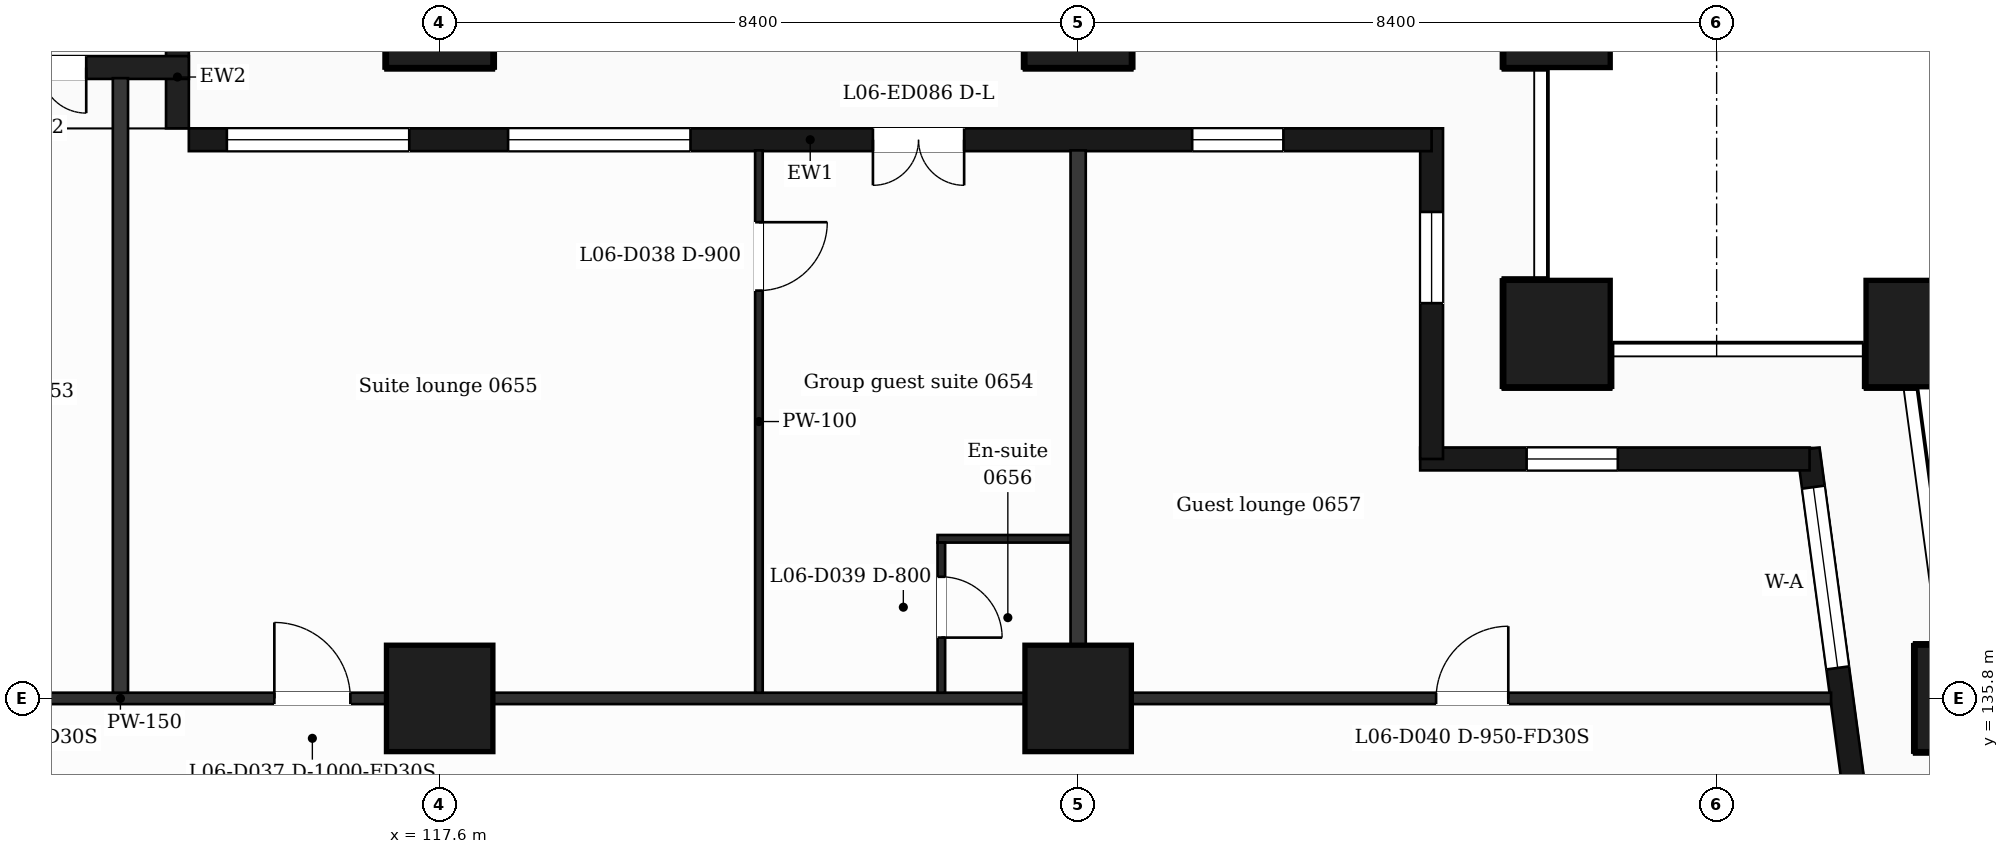
"""IFC4 building model, lengths in metres.
Left out: names, types, materials, properties, quantities, classifications, styles, units other than length and angle.
Written with IfcOpenShell. Run it as: python <this file> out.ifc"""

import sys

from ifc_helpers import new_model, si_unit, direction, frame, frame_2d, origin, origin_2d, place, context, subcontext, project, spatial, rectangle, extrude, element, fill, save


model = new_model("IFC4")
c1 = context("Model", 3, precision=1e-05, world=origin(), true_north=direction((0.0, 1.0)))
c2 = subcontext(c1, "Body", "Model", "MODEL_VIEW")
j1 = project(units=[si_unit("LENGTHUNIT", "METRE"), si_unit("PLANEANGLEUNIT", "RADIAN")], contexts=[c1])
p1 = place(None, origin())
s1 = spatial("IfcSite", under=j1, at=p1, CompositionType="ELEMENT")
p2 = place(p1, origin())
s2 = spatial("IfcBuilding", under=s1, at=p2, CompositionType="ELEMENT")
p3 = place(p2, frame((0.0, 0.0, 39.0)))
s3 = spatial("IfcBuildingStorey", under=s2, at=p3, CompositionType="ELEMENT", Elevation=39.0)
for number, where, z_axis, x_axis in (
    (1, (132.3, 140.6, -0.32), (0.0, 0.0, 1.0), (1.0, 0.0, 0.0)),
    (2, (137.065, 140.6, -0.32), (0.0, 0.0, 1.0), (1.0, 0.0, 0.0)),
    (3, (117.6, 135.8, -0.32), (0.0, 0.0, 1.0), (1.0, 0.0, 0.0)),
    (4, (126.0, 135.8, -0.32), (0.0, 0.0, 1.0), (1.0, 0.0, 0.0)),
    (5, (137.711, 135.8, -0.32), (0.0, 0.0, 1.0), (1.0, 0.0, 0.0)),
    (6, (117.6, 144.8, -0.32), (0.0, 0.0, 1.0), (1.0, 0.0, 0.0)),
    (7, (126.0, 144.8, -0.32), (0.0, 0.0, 1.0), (1.0, 0.0, 0.0)),
    (8, (132.3, 144.8, -0.32), (0.0, 0.0, 1.0), (1.0, 0.0, 0.0)),
):
    element("IfcColumn", number, at=place(p3, frame(where, z_axis=z_axis, x_axis=x_axis)), inside=s3, PredefinedType="COLUMN", context=c2, shape_type="SweptSolid", body=[
        extrude(rectangle(XDim=1.4, YDim=1.4, at=origin_2d()), origin(), (0.0, 0.0, 1.0), 3.82),
    ])
p4 = place(p3, frame((136.504, 132.4, 0.0), z_axis=(0.0, 0.0, 1.0), x_axis=(-0.133399697462, 0.99106231929, 0.0)))
e9 = element("IfcWall", 9, at=p4, inside=s3, PredefinedType="SOLIDWALL", context=c2, shape_type="SweptSolid", body=[
    extrude(rectangle(XDim=6.74, YDim=0.3, at=frame_2d((3.37, 0.0))), origin(), (0.0, 0.0, 1.0), 3.18),
])
p5 = place(p4, frame((1.115, 0.0, 0.0)))
e10 = element("IfcOpeningElement", 10, at=p5, cuts=e9, PredefinedType="OPENING", context=c2, shape_type="SweptSolid", body=[
    extrude(rectangle(XDim=1.2, YDim=2.4, at=frame_2d((0.6, 1.2))), frame((0.0, 0.16, 0.0), z_axis=(0.0, -1.0, 0.0), x_axis=(1.0, 0.0, 0.0)), (0.0, 0.0, 1.0), 0.32),
])
p6 = place(p4, frame((3.835, 0.0, 0.9)))
e11 = element("IfcOpeningElement", 11, at=p6, cuts=e9, PredefinedType="OPENING", context=c2, shape_type="SweptSolid", body=[
    extrude(rectangle(XDim=2.4, YDim=2.1, at=frame_2d((1.2, 1.05))), frame((0.0, 0.16, 0.0), z_axis=(0.0, -1.0, 0.0), x_axis=(1.0, 0.0, 0.0)), (0.0, 0.0, 1.0), 0.32),
])
p7 = place(p3, frame((135.623, 138.95, 0.0), z_axis=(0.0, 0.0, 1.0), x_axis=(-1.0, 0.0, 0.0)))
e12 = element("IfcWall", 12, at=p7, inside=s3, PredefinedType="SOLIDWALL", context=c2, shape_type="SweptSolid", body=[
    extrude(rectangle(XDim=5.123, YDim=0.3, at=frame_2d((2.561, 0.0))), origin(), (0.0, 0.0, 1.0), 3.18),
])
p8 = place(p7, frame((2.523, 0.0, 0.9)))
e13 = element("IfcOpeningElement", 13, at=p8, cuts=e12, PredefinedType="OPENING", context=c2, shape_type="SweptSolid", body=[
    extrude(rectangle(XDim=1.2, YDim=2.1, at=frame_2d((0.6, 1.05))), frame((0.0, 0.16, 0.0), z_axis=(0.0, -1.0, 0.0), x_axis=(1.0, 0.0, 0.0)), (0.0, 0.0, 1.0), 0.32),
])
p9 = place(p3, frame((130.65, 138.95, 0.0), z_axis=(0.0, 0.0, 1.0), x_axis=(0.0, 1.0, 0.0)))
e14 = element("IfcWall", 14, at=p9, inside=s3, PredefinedType="SOLIDWALL", context=c2, shape_type="SweptSolid", body=[
    extrude(rectangle(XDim=4.35, YDim=0.3, at=frame_2d((2.175, 0.0))), origin(), (0.0, 0.0, 1.0), 3.18),
])
p10 = place(p9, frame((2.05, 0.0, 0.9)))
e15 = element("IfcOpeningElement", 15, at=p10, cuts=e14, PredefinedType="OPENING", context=c2, shape_type="SweptSolid", body=[
    extrude(rectangle(XDim=1.2, YDim=2.1, at=frame_2d((0.6, 1.05))), frame((0.0, 0.16, 0.0), z_axis=(0.0, -1.0, 0.0), x_axis=(1.0, 0.0, 0.0)), (0.0, 0.0, 1.0), 0.32),
])
p11 = place(p3, frame((130.65, 143.15, 0.0), z_axis=(0.0, 0.0, 1.0), x_axis=(-1.0, 0.0, 0.0)))
e16 = element("IfcWall", 16, at=p11, inside=s3, PredefinedType="SOLIDWALL", context=c2, shape_type="SweptSolid", body=[
    extrude(rectangle(XDim=16.35, YDim=0.3, at=frame_2d((8.175, 0.0))), origin(), (0.0, 0.0, 1.0), 3.18),
])
p12 = place(p11, frame((1.95, 0.0, 0.9)))
e17 = element("IfcOpeningElement", 17, at=p12, cuts=e16, PredefinedType="OPENING", context=c2, shape_type="SweptSolid", body=[
    extrude(rectangle(XDim=1.2, YDim=2.1, at=frame_2d((0.6, 1.05))), frame((0.0, 0.16, 0.0), z_axis=(0.0, -1.0, 0.0), x_axis=(1.0, 0.0, 0.0)), (0.0, 0.0, 1.0), 0.32),
])
p13 = place(p11, frame((6.15, 0.0, 0.0)))
e18 = element("IfcOpeningElement", 18, at=p13, cuts=e16, PredefinedType="OPENING", context=c2, shape_type="SweptSolid", body=[
    extrude(rectangle(XDim=1.2, YDim=2.4, at=frame_2d((0.6, 1.2))), frame((0.0, 0.16, 0.0), z_axis=(0.0, -1.0, 0.0), x_axis=(1.0, 0.0, 0.0)), (0.0, 0.0, 1.0), 0.32),
])
p14 = place(p11, frame((9.75, 0.0, 0.9)))
e19 = element("IfcOpeningElement", 19, at=p14, cuts=e16, PredefinedType="OPENING", context=c2, shape_type="SweptSolid", body=[
    extrude(rectangle(XDim=2.4, YDim=2.1, at=frame_2d((1.2, 1.05))), frame((0.0, 0.16, 0.0), z_axis=(0.0, -1.0, 0.0), x_axis=(1.0, 0.0, 0.0)), (0.0, 0.0, 1.0), 0.32),
])
p15 = place(p11, frame((13.45, 0.0, 0.9)))
e20 = element("IfcOpeningElement", 20, at=p15, cuts=e16, PredefinedType="OPENING", context=c2, shape_type="SweptSolid", body=[
    extrude(rectangle(XDim=2.4, YDim=2.1, at=frame_2d((1.2, 1.05))), frame((0.0, 0.16, 0.0), z_axis=(0.0, -1.0, 0.0), x_axis=(1.0, 0.0, 0.0)), (0.0, 0.0, 1.0), 0.32),
])
p16 = place(p3, frame((114.15, 143.3, 0.0), z_axis=(0.0, 0.0, 1.0), x_axis=(0.0, 1.0, 0.0)))
e21 = element("IfcWall", 21, at=p16, inside=s3, PredefinedType="SOLIDWALL", context=c2, shape_type="SweptSolid", body=[
    extrude(rectangle(XDim=1.35, YDim=0.3, at=frame_2d((0.675, 0.0))), origin(), (0.0, 0.0, 1.0), 3.18),
])
p17 = place(p3, frame((114.3, 144.1, 0.0), z_axis=(0.0, 0.0, 1.0), x_axis=(-1.0, 0.0, 0.0)))
e22 = element("IfcWall", 22, at=p17, inside=s3, PredefinedType="SOLIDWALL", context=c2, shape_type="SweptSolid", body=[
    extrude(rectangle(XDim=3.9, YDim=0.3, at=frame_2d((1.95, 0.0))), origin(), (0.0, 0.0, 1.0), 3.18),
])
p18 = place(p17, frame((1.35, 0.0, 0.0)))
e23 = element("IfcOpeningElement", 23, at=p18, cuts=e22, PredefinedType="OPENING", context=c2, shape_type="SweptSolid", body=[
    extrude(rectangle(XDim=1.2, YDim=2.4, at=frame_2d((0.6, 1.2))), frame((0.0, 0.16, 0.0), z_axis=(0.0, -1.0, 0.0), x_axis=(1.0, 0.0, 0.0)), (0.0, 0.0, 1.0), 0.32),
])
p19 = place(p3, frame((90.895, 135.8, 0.0), z_axis=(0.0, 0.0, 1.0), x_axis=(1.0, 0.0, 0.0)))
e24 = element("IfcWall", 24, at=p19, inside=s3, PredefinedType="PARTITIONING", context=c2, shape_type="SweptSolid", body=[
    extrude(rectangle(XDim=45.011, YDim=0.15, at=frame_2d((22.505, 0.0))), origin(), (0.0, 0.0, 1.0), 3.18),
])
p20 = place(p19, frame((7.235, 0.0, 0.0)))
e25 = element("IfcOpeningElement", 25, at=p20, cuts=e24, PredefinedType="OPENING", context=c2, shape_type="SweptSolid", body=[
    extrude(rectangle(XDim=1.0, YDim=2.1, at=frame_2d((0.5, 1.05))), frame((0.0, 0.085, 0.0), z_axis=(0.0, -1.0, 0.0), x_axis=(1.0, 0.0, 0.0)), (0.0, 0.0, 1.0), 0.17),
])
p21 = place(p19, frame((12.73, 0.0, 0.0)))
e26 = element("IfcOpeningElement", 26, at=p21, cuts=e24, PredefinedType="OPENING", context=c2, shape_type="SweptSolid", body=[
    extrude(rectangle(XDim=0.95, YDim=2.1, at=frame_2d((0.475, 1.05))), frame((0.0, 0.085, 0.0), z_axis=(0.0, -1.0, 0.0), x_axis=(1.0, 0.0, 0.0)), (0.0, 0.0, 1.0), 0.17),
])
p22 = place(p19, frame((20.185, 0.0, 0.0)))
e27 = element("IfcOpeningElement", 27, at=p22, cuts=e24, PredefinedType="OPENING", context=c2, shape_type="SweptSolid", body=[
    extrude(rectangle(XDim=0.95, YDim=2.1, at=frame_2d((0.475, 1.05))), frame((0.0, 0.085, 0.0), z_axis=(0.0, -1.0, 0.0), x_axis=(1.0, 0.0, 0.0)), (0.0, 0.0, 1.0), 0.17),
])
p23 = place(p19, frame((24.531, 0.0, 0.0)))
e28 = element("IfcOpeningElement", 28, at=p23, cuts=e24, PredefinedType="OPENING", context=c2, shape_type="SweptSolid", body=[
    extrude(rectangle(XDim=1.0, YDim=2.1, at=frame_2d((0.5, 1.05))), frame((0.0, 0.085, 0.0), z_axis=(0.0, -1.0, 0.0), x_axis=(1.0, 0.0, 0.0)), (0.0, 0.0, 1.0), 0.17),
])
p24 = place(p19, frame((39.814, 0.0, 0.0)))
e29 = element("IfcOpeningElement", 29, at=p24, cuts=e24, PredefinedType="OPENING", context=c2, shape_type="SweptSolid", body=[
    extrude(rectangle(XDim=0.95, YDim=2.1, at=frame_2d((0.475, 1.05))), frame((0.0, 0.085, 0.0), z_axis=(0.0, -1.0, 0.0), x_axis=(1.0, 0.0, 0.0)), (0.0, 0.0, 1.0), 0.17),
])
p25 = place(p3, frame((124.15, 137.9, 0.0), z_axis=(0.0, 0.0, 1.0), x_axis=(1.0, 0.0, 0.0)))
e30 = element("IfcWall", 30, at=p25, inside=s3, PredefinedType="PARTITIONING", context=c2, shape_type="SweptSolid", body=[
    extrude(rectangle(XDim=1.85, YDim=0.1, at=frame_2d((0.925, 0.0))), origin(), (0.0, 0.0, 1.0), 3.18),
])
p26 = place(p3, frame((113.4, 135.875, 0.0), z_axis=(0.0, 0.0, 1.0), x_axis=(0.0, 1.0, 0.0)))
e31 = element("IfcWall", 31, at=p26, inside=s3, PredefinedType="PARTITIONING", context=c2, shape_type="SweptSolid", body=[
    extrude(rectangle(XDim=8.085, YDim=0.2, at=frame_2d((4.042, 0.0))), origin(), (0.0, 0.0, 1.0), 3.18),
])
p27 = place(p3, frame((121.8, 135.875, 0.0), z_axis=(0.0, 0.0, 1.0), x_axis=(0.0, 1.0, 0.0)))
e32 = element("IfcWall", 32, at=p27, inside=s3, PredefinedType="PARTITIONING", context=c2, shape_type="SweptSolid", body=[
    extrude(rectangle(XDim=7.135, YDim=0.1, at=frame_2d((3.567, 0.0))), origin(), (0.0, 0.0, 1.0), 3.18),
])
p28 = place(p27, frame((5.29, 0.0, 0.0)))
e33 = element("IfcOpeningElement", 33, at=p28, cuts=e32, PredefinedType="OPENING", context=c2, shape_type="SweptSolid", body=[
    extrude(rectangle(XDim=0.9, YDim=2.1, at=frame_2d((0.45, 1.05))), frame((0.0, 0.06, 0.0), z_axis=(0.0, -1.0, 0.0), x_axis=(1.0, 0.0, 0.0)), (0.0, 0.0, 1.0), 0.12),
])
p29 = place(p3, frame((124.2, 135.875, 0.0), z_axis=(0.0, 0.0, 1.0), x_axis=(0.0, 1.0, 0.0)))
e34 = element("IfcWall", 34, at=p29, inside=s3, PredefinedType="PARTITIONING", context=c2, shape_type="SweptSolid", body=[
    extrude(rectangle(XDim=1.975, YDim=0.1, at=frame_2d((0.988, 0.0))), origin(), (0.0, 0.0, 1.0), 3.18),
])
p30 = place(p29, frame((0.725, 0.0, 0.0)))
e35 = element("IfcOpeningElement", 35, at=p30, cuts=e34, PredefinedType="OPENING", context=c2, shape_type="SweptSolid", body=[
    extrude(rectangle(XDim=0.8, YDim=2.1, at=frame_2d((0.4, 1.05))), frame((0.0, 0.06, 0.0), z_axis=(0.0, -1.0, 0.0), x_axis=(1.0, 0.0, 0.0)), (0.0, 0.0, 1.0), 0.12),
])
p31 = place(p3, frame((126.0, 135.875, 0.0), z_axis=(0.0, 0.0, 1.0), x_axis=(0.0, 1.0, 0.0)))
e36 = element("IfcWall", 36, at=p31, inside=s3, PredefinedType="PARTITIONING", context=c2, shape_type="SweptSolid", body=[
    extrude(rectangle(XDim=7.135, YDim=0.2, at=frame_2d((3.567, 0.0))), origin(), (0.0, 0.0, 1.0), 3.18),
])
p32 = place(p6, origin())
e37 = element("IfcWindow", 37, at=p32, inside=s3, PartitioningType="SINGLE_PANEL", PredefinedType="WINDOW", context=c2, shape_type="SweptSolid", body=[
    extrude(rectangle(XDim=2.4, YDim=2.1, at=frame_2d((1.2, 1.05))), frame((0.0, 0.03, 0.0), z_axis=(0.0, -1.0, 0.0), x_axis=(1.0, 0.0, 0.0)), (0.0, 0.0, 1.0), 0.06),
])
fill(e11, e37)
p33 = place(p8, origin())
e38 = element("IfcWindow", 38, at=p33, inside=s3, PartitioningType="SINGLE_PANEL", PredefinedType="WINDOW", context=c2, shape_type="SweptSolid", body=[
    extrude(rectangle(XDim=1.2, YDim=2.1, at=frame_2d((0.6, 1.05))), frame((0.0, 0.03, 0.0), z_axis=(0.0, -1.0, 0.0), x_axis=(1.0, 0.0, 0.0)), (0.0, 0.0, 1.0), 0.06),
])
fill(e13, e38)
p34 = place(p10, origin())
e39 = element("IfcWindow", 39, at=p34, inside=s3, PartitioningType="SINGLE_PANEL", PredefinedType="WINDOW", context=c2, shape_type="SweptSolid", body=[
    extrude(rectangle(XDim=1.2, YDim=2.1, at=frame_2d((0.6, 1.05))), frame((0.0, 0.03, 0.0), z_axis=(0.0, -1.0, 0.0), x_axis=(1.0, 0.0, 0.0)), (0.0, 0.0, 1.0), 0.06),
])
fill(e15, e39)
p35 = place(p12, origin())
e40 = element("IfcWindow", 40, at=p35, inside=s3, PartitioningType="SINGLE_PANEL", PredefinedType="WINDOW", context=c2, shape_type="SweptSolid", body=[
    extrude(rectangle(XDim=1.2, YDim=2.1, at=frame_2d((0.6, 1.05))), frame((0.0, 0.03, 0.0), z_axis=(0.0, -1.0, 0.0), x_axis=(1.0, 0.0, 0.0)), (0.0, 0.0, 1.0), 0.06),
])
fill(e17, e40)
p36 = place(p13, origin())
e41 = element("IfcDoor", 41, at=p36, inside=s3, OperationType="DOUBLE_DOOR_SINGLE_SWING", PredefinedType="DOOR", context=c2, shape_type="SweptSolid", body=[
    extrude(rectangle(XDim=1.2, YDim=2.4, at=frame_2d((0.6, 1.2))), frame((0.0, 0.025, 0.0), z_axis=(0.0, -1.0, 0.0), x_axis=(1.0, 0.0, 0.0)), (0.0, 0.0, 1.0), 0.05),
])
fill(e18, e41)
p37 = place(p14, origin())
e42 = element("IfcWindow", 42, at=p37, inside=s3, PartitioningType="SINGLE_PANEL", PredefinedType="WINDOW", context=c2, shape_type="SweptSolid", body=[
    extrude(rectangle(XDim=2.4, YDim=2.1, at=frame_2d((1.2, 1.05))), frame((0.0, 0.03, 0.0), z_axis=(0.0, -1.0, 0.0), x_axis=(1.0, 0.0, 0.0)), (0.0, 0.0, 1.0), 0.06),
])
fill(e19, e42)
p38 = place(p15, origin())
e43 = element("IfcWindow", 43, at=p38, inside=s3, PartitioningType="SINGLE_PANEL", PredefinedType="WINDOW", context=c2, shape_type="SweptSolid", body=[
    extrude(rectangle(XDim=2.4, YDim=2.1, at=frame_2d((1.2, 1.05))), frame((0.0, 0.03, 0.0), z_axis=(0.0, -1.0, 0.0), x_axis=(1.0, 0.0, 0.0)), (0.0, 0.0, 1.0), 0.06),
])
fill(e20, e43)
p39 = place(p18, origin())
e44 = element("IfcDoor", 44, at=p39, inside=s3, OperationType="DOUBLE_DOOR_SINGLE_SWING", PredefinedType="DOOR", context=c2, shape_type="SweptSolid", body=[
    extrude(rectangle(XDim=1.2, YDim=2.4, at=frame_2d((0.6, 1.2))), frame((0.0, 0.025, 0.0), z_axis=(0.0, -1.0, 0.0), x_axis=(1.0, 0.0, 0.0)), (0.0, 0.0, 1.0), 0.05),
])
fill(e23, e44)
p40 = place(p23, origin())
e45 = element("IfcDoor", 45, at=p40, inside=s3, OperationType="SINGLE_SWING_LEFT", PredefinedType="DOOR", context=c2, shape_type="SweptSolid", body=[
    extrude(rectangle(XDim=1.0, YDim=2.1, at=frame_2d((0.5, 1.05))), frame((0.0, 0.025, 0.0), z_axis=(0.0, -1.0, 0.0), x_axis=(1.0, 0.0, 0.0)), (0.0, 0.0, 1.0), 0.05),
])
fill(e28, e45)
p41 = place(p28, origin())
e46 = element("IfcDoor", 46, at=p41, inside=s3, OperationType="SINGLE_SWING_RIGHT", PredefinedType="DOOR", context=c2, shape_type="SweptSolid", body=[
    extrude(rectangle(XDim=0.9, YDim=2.1, at=frame_2d((0.45, 1.05))), frame((0.0, 0.025, 0.0), z_axis=(0.0, -1.0, 0.0), x_axis=(1.0, 0.0, 0.0)), (0.0, 0.0, 1.0), 0.05),
])
fill(e33, e46)
p42 = place(p30, origin())
e47 = element("IfcDoor", 47, at=p42, inside=s3, OperationType="SINGLE_SWING_LEFT", PredefinedType="DOOR", context=c2, shape_type="SweptSolid", body=[
    extrude(rectangle(XDim=0.8, YDim=2.1, at=frame_2d((0.4, 1.05))), frame((0.0, 0.025, 0.0), z_axis=(0.0, -1.0, 0.0), x_axis=(1.0, 0.0, 0.0)), (0.0, 0.0, 1.0), 0.05),
])
fill(e35, e47)
p43 = place(p24, origin())
e48 = element("IfcDoor", 48, at=p43, inside=s3, OperationType="SINGLE_SWING_RIGHT", PredefinedType="DOOR", context=c2, shape_type="SweptSolid", body=[
    extrude(rectangle(XDim=0.95, YDim=2.1, at=frame_2d((0.475, 1.05))), frame((0.0, 0.025, 0.0), z_axis=(0.0, -1.0, 0.0), x_axis=(1.0, 0.0, 0.0)), (0.0, 0.0, 1.0), 0.05),
])
fill(e29, e48)
save(model, sys.argv[1])
